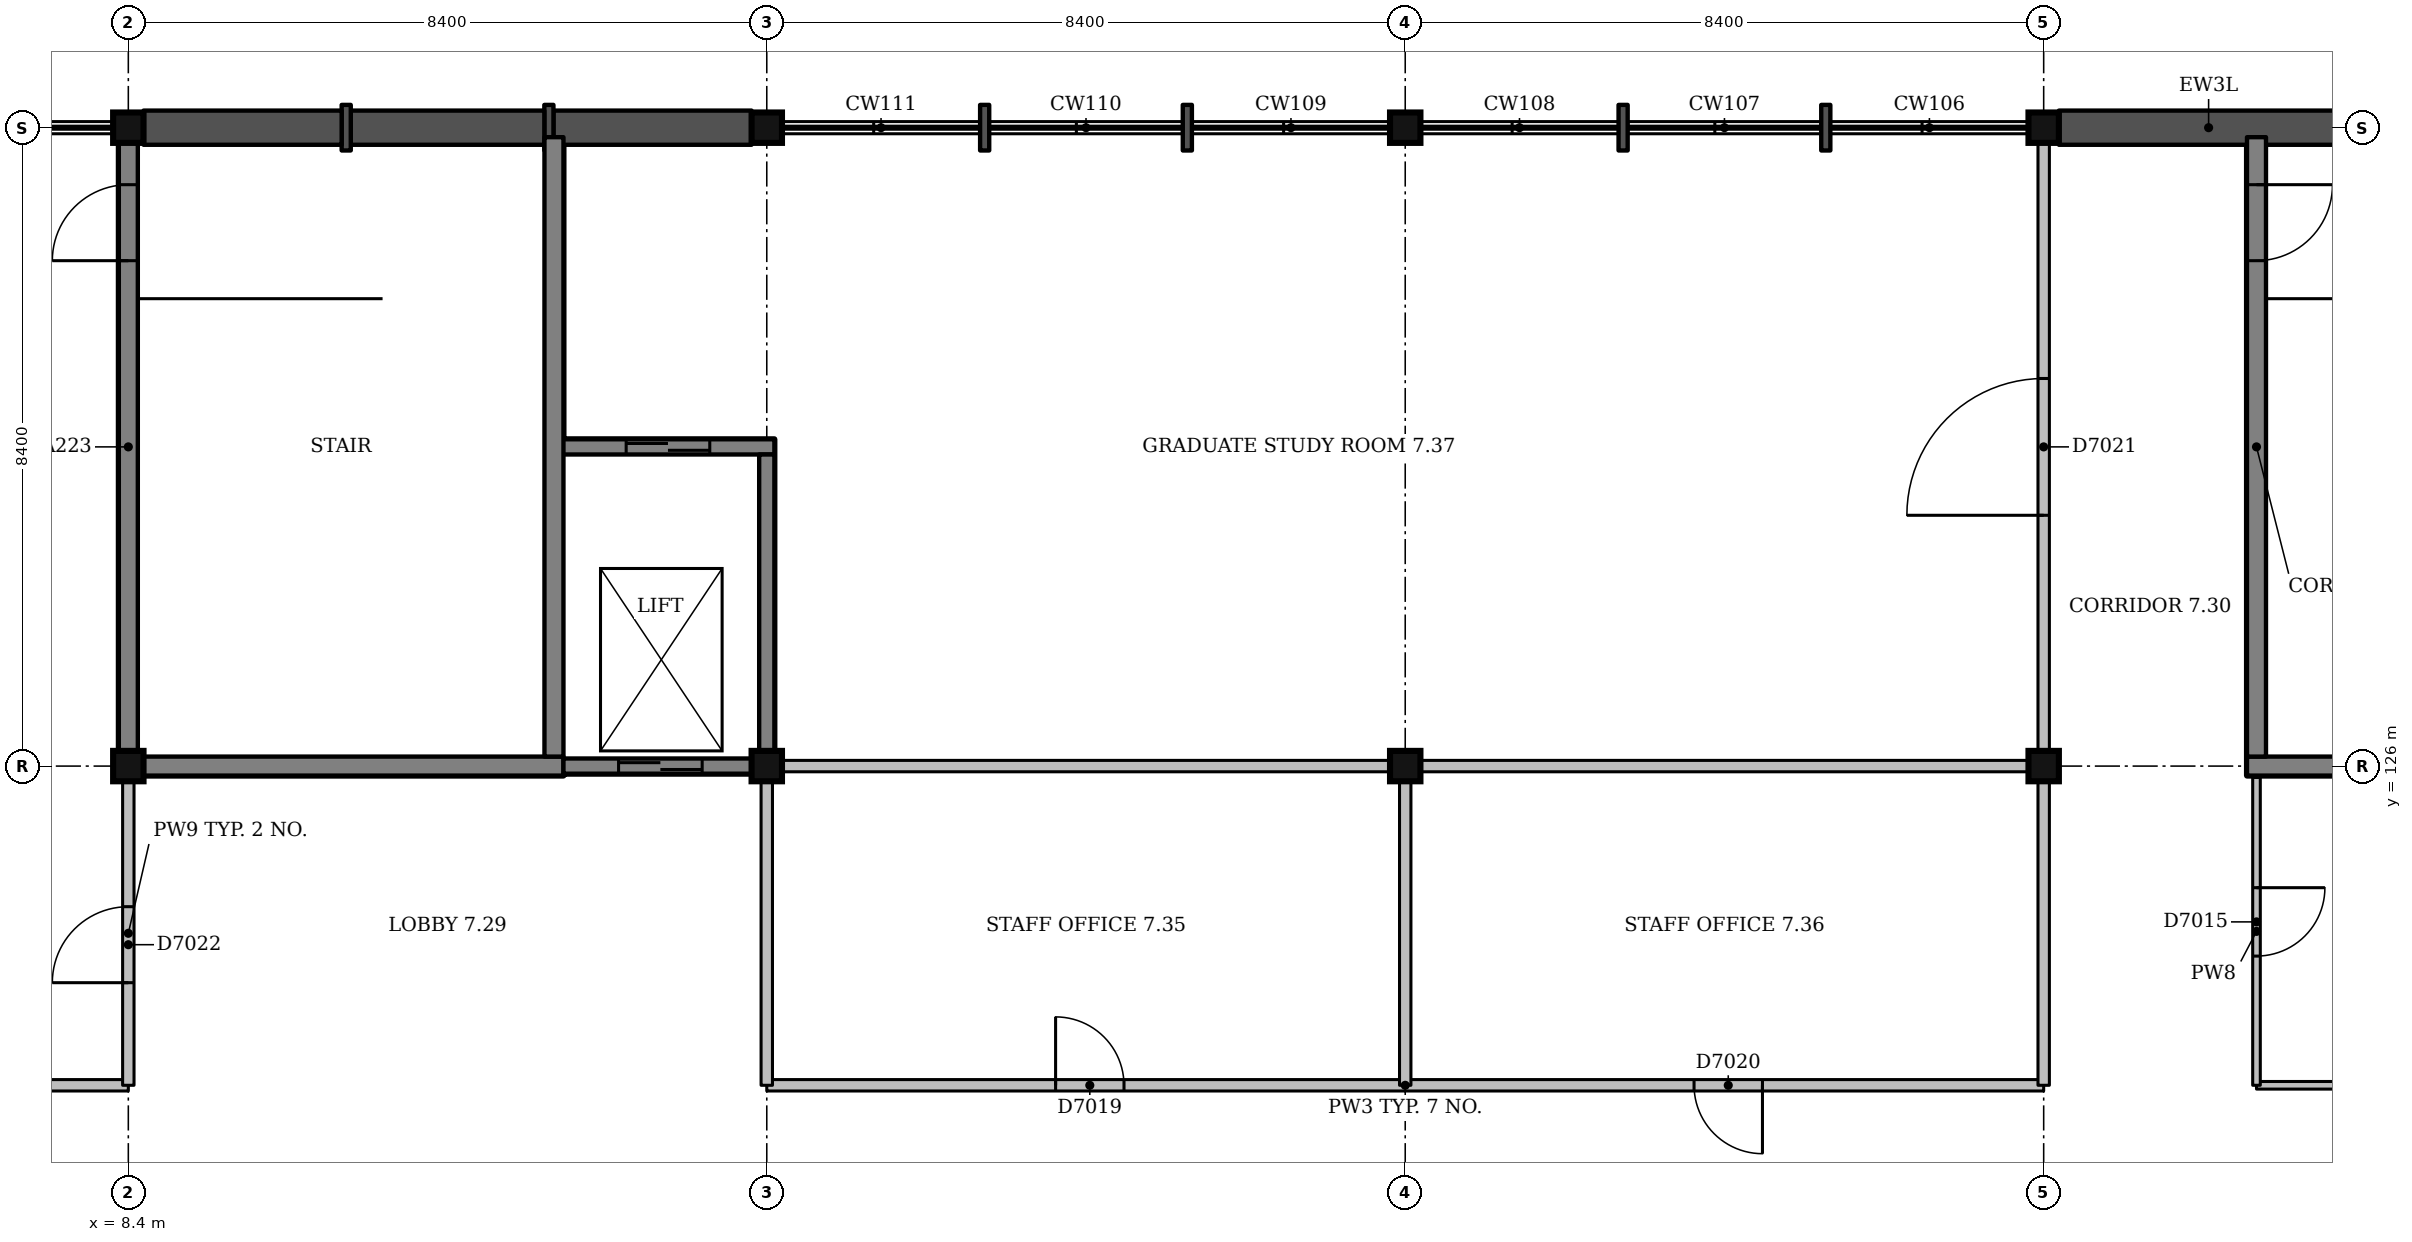
"""IFC4 building model, lengths in metres.
Left out: names, types, materials, properties, quantities, classifications, styles, units other than length and angle.
Written with IfcOpenShell. Run it as: python <this file> out.ifc"""

import sys

from ifc_helpers import new_model, si_unit, direction, frame, frame_2d, origin, origin_2d, place, context, subcontext, project, spatial, rectangle, extrude, element, fill, save


model = new_model("IFC4")
c1 = context("Model", 3, precision=1e-05, world=origin(), true_north=direction((0.0, 1.0)))
c2 = subcontext(c1, "Body", "Model", "MODEL_VIEW")
j1 = project(units=[si_unit("LENGTHUNIT", "METRE"), si_unit("PLANEANGLEUNIT", "RADIAN")], contexts=[c1])
p1 = place(None, origin())
s1 = spatial("IfcSite", under=j1, at=p1, CompositionType="ELEMENT")
p2 = place(p1, origin())
s2 = spatial("IfcBuilding", under=s1, at=p2, CompositionType="ELEMENT")
p3 = place(p2, frame((0.0, 0.0, 31.5)))
s3 = spatial("IfcBuildingStorey", under=s2, at=p3, CompositionType="ELEMENT", Elevation=31.5)
for number, where, z_axis, x_axis in (
    (1, (8.4, 126.0, 0.0), (0.0, 0.0, 1.0), (1.0, 0.0, 0.0)),
    (2, (8.4, 134.4, 0.0), (0.0, 0.0, 1.0), (1.0, 0.0, 0.0)),
    (3, (16.8, 126.0, 0.0), (0.0, 0.0, 1.0), (1.0, 0.0, 0.0)),
    (4, (16.8, 134.4, 0.0), (0.0, 0.0, 1.0), (1.0, 0.0, 0.0)),
    (5, (25.2, 126.0, 0.0), (0.0, 0.0, 1.0), (1.0, 0.0, 0.0)),
    (6, (25.2, 134.4, 0.0), (0.0, 0.0, 1.0), (1.0, 0.0, 0.0)),
    (7, (33.6, 126.0, 0.0), (0.0, 0.0, 1.0), (1.0, 0.0, 0.0)),
    (8, (33.6, 134.4, 0.0), (0.0, 0.0, 1.0), (1.0, 0.0, 0.0)),
):
    element("IfcColumn", number, at=place(p3, frame(where, z_axis=z_axis, x_axis=x_axis)), inside=s3, PredefinedType="COLUMN", context=c2, shape_type="SweptSolid", body=[
        extrude(rectangle(XDim=0.4, YDim=0.4, at=origin_2d()), origin(), (0.0, 0.0, 1.0), 4.5),
    ])
p4 = place(p3, frame((13.9, 130.2, 0.0), z_axis=(0.0, 0.0, 1.0), x_axis=(1.0, 0.0, 0.0)))
e9 = element("IfcWall", 9, at=p4, inside=s3, PredefinedType="SHEAR", context=c2, shape_type="SweptSolid", body=[
    extrude(rectangle(XDim=3.0, YDim=0.2, at=frame_2d((1.5, 0.0))), origin(), (0.0, 0.0, 1.0), 4.5),
])
p5 = place(p4, frame((1.05, 0.0, 0.0)))
e10 = element("IfcOpeningElement", 10, at=p5, cuts=e9, PredefinedType="OPENING", context=c2, shape_type="SweptSolid", body=[
    extrude(rectangle(XDim=1.1, YDim=2.1, at=frame_2d((0.55, 1.05))), frame((0.0, 0.11, 0.0), z_axis=(0.0, -1.0, 0.0), x_axis=(1.0, 0.0, 0.0)), (0.0, 0.0, 1.0), 0.22),
])
p6 = place(p3, frame((16.8, 126.2, 0.0), z_axis=(0.0, 0.0, 1.0), x_axis=(0.0, 1.0, 0.0)))
e11 = element("IfcWall", 11, at=p6, inside=s3, PredefinedType="SHEAR", context=c2, shape_type="SweptSolid", body=[
    extrude(rectangle(XDim=3.9, YDim=0.2, at=frame_2d((1.95, 0.0))), origin(), (0.0, 0.0, 1.0), 4.5),
])
p7 = place(p3, frame((36.275, 126.0, 0.0), z_axis=(0.0, 0.0, 1.0), x_axis=(1.0, 0.0, 0.0)))
e12 = element("IfcWall", 12, at=p7, inside=s3, PredefinedType="SHEAR", context=c2, shape_type="SweptSolid", body=[
    extrude(rectangle(XDim=5.525, YDim=0.25, at=frame_2d((2.763, 0.0))), origin(), (0.0, 0.0, 1.0), 4.2),
])
p8 = place(p3, frame((36.4, 126.125, 0.0), z_axis=(0.0, 0.0, 1.0), x_axis=(0.0, 1.0, 0.0)))
e13 = element("IfcWall", 13, at=p8, inside=s3, PredefinedType="SHEAR", context=c2, shape_type="SweptSolid", body=[
    extrude(rectangle(XDim=8.15, YDim=0.25, at=frame_2d((4.075, 0.0))), origin(), (0.0, 0.0, 1.0), 4.2),
])
p9 = place(p8, frame((6.525, 0.0, 0.0)))
e14 = element("IfcOpeningElement", 14, at=p9, cuts=e13, PredefinedType="OPENING", context=c2, shape_type="SweptSolid", body=[
    extrude(rectangle(XDim=1.0, YDim=2.1, at=frame_2d((0.5, 1.05))), frame((0.0, 0.135, 0.0), z_axis=(0.0, -1.0, 0.0), x_axis=(1.0, 0.0, 0.0)), (0.0, 0.0, 1.0), 0.27),
])
p10 = place(p3, frame((8.6, 126.0, 0.0), z_axis=(0.0, 0.0, 1.0), x_axis=(1.0, 0.0, 0.0)))
e15 = element("IfcWall", 15, at=p10, inside=s3, PredefinedType="SHEAR", context=c2, shape_type="SweptSolid", body=[
    extrude(rectangle(XDim=5.525, YDim=0.25, at=frame_2d((2.762, 0.0))), origin(), (0.0, 0.0, 1.0), 4.2),
])
p11 = place(p3, frame((8.4, 126.2, 0.0), z_axis=(0.0, 0.0, 1.0), x_axis=(0.0, 1.0, 0.0)))
e16 = element("IfcWall", 16, at=p11, inside=s3, PredefinedType="SHEAR", context=c2, shape_type="SweptSolid", body=[
    extrude(rectangle(XDim=8.0, YDim=0.25, at=frame_2d((4.0, 0.0))), origin(), (0.0, 0.0, 1.0), 4.2),
])
p12 = place(p11, frame((6.45, 0.0, 0.0)))
e17 = element("IfcOpeningElement", 17, at=p12, cuts=e16, PredefinedType="OPENING", context=c2, shape_type="SweptSolid", body=[
    extrude(rectangle(XDim=1.0, YDim=2.1, at=frame_2d((0.5, 1.05))), frame((0.0, 0.135, 0.0), z_axis=(0.0, -1.0, 0.0), x_axis=(1.0, 0.0, 0.0)), (0.0, 0.0, 1.0), 0.27),
])
p13 = place(p3, frame((14.0, 126.125, 0.0), z_axis=(0.0, 0.0, 1.0), x_axis=(0.0, 1.0, 0.0)))
e18 = element("IfcWall", 18, at=p13, inside=s3, PredefinedType="SHEAR", context=c2, shape_type="SweptSolid", body=[
    extrude(rectangle(XDim=8.15, YDim=0.25, at=frame_2d((4.075, 0.0))), origin(), (0.0, 0.0, 1.0), 4.2),
])
p14 = place(p3, frame((37.74, 134.4, 0.0), z_axis=(0.0, 0.0, 1.0), x_axis=(-1.0, 0.0, 0.0)))
e19 = element("IfcWall", 19, at=p14, inside=s3, PredefinedType="SOLIDWALL", context=c2, shape_type="SweptSolid", body=[
    extrude(rectangle(XDim=3.94, YDim=0.45, at=frame_2d((1.97, 0.0))), origin(), (0.0, 0.0, 1.0), 3.6),
])
p15 = place(p3, frame((30.793, 134.4, 0.0), z_axis=(0.0, 0.0, 1.0), x_axis=(-1.0, 0.0, 0.0)))
e20 = element("IfcWall", 20, at=p15, inside=s3, PredefinedType="SOLIDWALL", context=c2, shape_type="SweptSolid", body=[
    extrude(rectangle(XDim=0.12, YDim=0.6, at=frame_2d((0.06, 0.0))), origin(), (0.0, 0.0, 1.0), 3.6),
])
for number, where, z_axis, x_axis in (
    (21, (28.127, 134.4, 0.0), (0.0, 0.0, 1.0), (-1.0, 0.0, 0.0)),
    (22, (22.393, 134.4, 0.0), (0.0, 0.0, 1.0), (-1.0, 0.0, 0.0)),
    (23, (19.727, 134.4, 0.0), (0.0, 0.0, 1.0), (-1.0, 0.0, 0.0)),
):
    element("IfcWall", number, at=place(p3, frame(where, z_axis=z_axis, x_axis=x_axis)), inside=s3, PredefinedType="SOLIDWALL", context=c2, shape_type="SweptSolid", body=[
        extrude(rectangle(XDim=0.12, YDim=0.6, at=frame_2d((0.06, 0.0))), origin(), (0.0, 0.0, 1.0), 3.6),
    ])
p16 = place(p3, frame((16.6, 134.4, 0.0), z_axis=(0.0, 0.0, 1.0), x_axis=(-1.0, 0.0, 0.0)))
e24 = element("IfcWall", 24, at=p16, inside=s3, PredefinedType="SOLIDWALL", context=c2, shape_type="SweptSolid", body=[
    extrude(rectangle(XDim=2.607, YDim=0.45, at=frame_2d((1.303, 0.0))), origin(), (0.0, 0.0, 1.0), 3.6),
])
p17 = place(p3, frame((13.993, 134.4, 0.0), z_axis=(0.0, 0.0, 1.0), x_axis=(-1.0, 0.0, 0.0)))
e25 = element("IfcWall", 25, at=p17, inside=s3, PredefinedType="SOLIDWALL", context=c2, shape_type="SweptSolid", body=[
    extrude(rectangle(XDim=0.12, YDim=0.6, at=frame_2d((0.06, 0.0))), origin(), (0.0, 0.0, 1.0), 3.6),
])
p18 = place(p3, frame((13.873, 134.4, 0.0), z_axis=(0.0, 0.0, 1.0), x_axis=(-1.0, 0.0, 0.0)))
e26 = element("IfcWall", 26, at=p18, inside=s3, PredefinedType="SOLIDWALL", context=c2, shape_type="SweptSolid", body=[
    extrude(rectangle(XDim=2.547, YDim=0.45, at=frame_2d((1.273, 0.0))), origin(), (0.0, 0.0, 1.0), 3.6),
])
p19 = place(p3, frame((11.327, 134.4, 0.0), z_axis=(0.0, 0.0, 1.0), x_axis=(-1.0, 0.0, 0.0)))
e27 = element("IfcWall", 27, at=p19, inside=s3, PredefinedType="SOLIDWALL", context=c2, shape_type="SweptSolid", body=[
    extrude(rectangle(XDim=0.12, YDim=0.6, at=frame_2d((0.06, 0.0))), origin(), (0.0, 0.0, 1.0), 3.6),
])
p20 = place(p3, frame((11.207, 134.4, 0.0), z_axis=(0.0, 0.0, 1.0), x_axis=(-1.0, 0.0, 0.0)))
e28 = element("IfcWall", 28, at=p20, inside=s3, PredefinedType="SOLIDWALL", context=c2, shape_type="SweptSolid", body=[
    extrude(rectangle(XDim=2.607, YDim=0.45, at=frame_2d((1.303, 0.0))), origin(), (0.0, 0.0, 1.0), 3.6),
])
p21 = place(p3, frame((0.275, 121.8, 0.0), z_axis=(0.0, 0.0, 1.0), x_axis=(1.0, 0.0, 0.0)))
e29 = element("IfcWall", 29, at=p21, inside=s3, PredefinedType="PARTITIONING", context=c2, shape_type="SweptSolid", body=[
    extrude(rectangle(XDim=8.125, YDim=0.15, at=frame_2d((4.062, 0.0))), origin(), (0.0, 0.0, 1.0), 3.6),
])
p22 = place(p3, frame((16.8, 121.8, 0.0), z_axis=(0.0, 0.0, 1.0), x_axis=(1.0, 0.0, 0.0)))
e30 = element("IfcWall", 30, at=p22, inside=s3, PredefinedType="PARTITIONING", context=c2, shape_type="SweptSolid", body=[
    extrude(rectangle(XDim=16.8, YDim=0.15, at=frame_2d((8.4, 0.0))), origin(), (0.0, 0.0, 1.0), 3.6),
])
p23 = place(p22, frame((3.8, 0.0, 0.0)))
e31 = element("IfcOpeningElement", 31, at=p23, cuts=e30, PredefinedType="OPENING", context=c2, shape_type="SweptSolid", body=[
    extrude(rectangle(XDim=0.9, YDim=2.1, at=frame_2d((0.45, 1.05))), frame((0.0, 0.085, 0.0), z_axis=(0.0, -1.0, 0.0), x_axis=(1.0, 0.0, 0.0)), (0.0, 0.0, 1.0), 0.17),
])
p24 = place(p22, frame((12.2, 0.0, 0.0)))
e32 = element("IfcOpeningElement", 32, at=p24, cuts=e30, PredefinedType="OPENING", context=c2, shape_type="SweptSolid", body=[
    extrude(rectangle(XDim=0.9, YDim=2.1, at=frame_2d((0.45, 1.05))), frame((0.0, 0.085, 0.0), z_axis=(0.0, -1.0, 0.0), x_axis=(1.0, 0.0, 0.0)), (0.0, 0.0, 1.0), 0.17),
])
p25 = place(p3, frame((36.4, 121.8, 0.0), z_axis=(0.0, 0.0, 1.0), x_axis=(1.0, 0.0, 0.0)))
e33 = element("IfcWall", 33, at=p25, inside=s3, PredefinedType="PARTITIONING", context=c2, shape_type="SweptSolid", body=[
    extrude(rectangle(XDim=5.4, YDim=0.1, at=frame_2d((2.7, 0.0))), origin(), (0.0, 0.0, 1.0), 4.15),
])
for number, where, z_axis, x_axis in (
    (34, (17.0, 126.0, 0.0), (0.0, 0.0, 1.0), (1.0, 0.0, 0.0)),
    (35, (25.4, 126.0, 0.0), (0.0, 0.0, 1.0), (1.0, 0.0, 0.0)),
):
    element("IfcWall", number, at=place(p3, frame(where, z_axis=z_axis, x_axis=x_axis)), inside=s3, PredefinedType="PARTITIONING", context=c2, shape_type="SweptSolid", body=[
        extrude(rectangle(XDim=8.0, YDim=0.15, at=frame_2d((4.0, 0.0))), origin(), (0.0, 0.0, 1.0), 3.6),
    ])
p26 = place(p3, frame((8.4, 121.8, 0.0), z_axis=(0.0, 0.0, 1.0), x_axis=(0.0, 1.0, 0.0)))
e36 = element("IfcWall", 36, at=p26, inside=s3, PredefinedType="PARTITIONING", context=c2, shape_type="SweptSolid", body=[
    extrude(rectangle(XDim=4.0, YDim=0.15, at=frame_2d((2.0, 0.0))), origin(), (0.0, 0.0, 1.0), 3.6),
])
p27 = place(p26, frame((1.35, 0.0, 0.0)))
e37 = element("IfcOpeningElement", 37, at=p27, cuts=e36, PredefinedType="OPENING", context=c2, shape_type="SweptSolid", body=[
    extrude(rectangle(XDim=1.0, YDim=2.1, at=frame_2d((0.5, 1.05))), frame((0.0, 0.085, 0.0), z_axis=(0.0, -1.0, 0.0), x_axis=(1.0, 0.0, 0.0)), (0.0, 0.0, 1.0), 0.17),
])
for number, where, z_axis, x_axis in (
    (38, (16.8, 121.8, 0.0), (0.0, 0.0, 1.0), (0.0, 1.0, 0.0)),
    (39, (25.2, 121.8, 0.0), (0.0, 0.0, 1.0), (0.0, 1.0, 0.0)),
    (40, (33.6, 121.8, 0.0), (0.0, 0.0, 1.0), (0.0, 1.0, 0.0)),
):
    element("IfcWall", number, at=place(p3, frame(where, z_axis=z_axis, x_axis=x_axis)), inside=s3, PredefinedType="PARTITIONING", context=c2, shape_type="SweptSolid", body=[
        extrude(rectangle(XDim=4.0, YDim=0.15, at=frame_2d((2.0, 0.0))), origin(), (0.0, 0.0, 1.0), 3.6),
    ])
p28 = place(p3, frame((33.6, 126.2, 0.0), z_axis=(0.0, 0.0, 1.0), x_axis=(0.0, 1.0, 0.0)))
e41 = element("IfcWall", 41, at=p28, inside=s3, PredefinedType="PARTITIONING", context=c2, shape_type="SweptSolid", body=[
    extrude(rectangle(XDim=8.0, YDim=0.15, at=frame_2d((4.0, 0.0))), origin(), (0.0, 0.0, 1.0), 3.6),
])
p29 = place(p28, frame((3.1, 0.0, 0.0)))
e42 = element("IfcOpeningElement", 42, at=p29, cuts=e41, PredefinedType="OPENING", context=c2, shape_type="SweptSolid", body=[
    extrude(rectangle(XDim=1.8, YDim=2.1, at=frame_2d((0.9, 1.05))), frame((0.0, 0.085, 0.0), z_axis=(0.0, -1.0, 0.0), x_axis=(1.0, 0.0, 0.0)), (0.0, 0.0, 1.0), 0.17),
])
p30 = place(p3, frame((36.4, 121.8, 0.0), z_axis=(0.0, 0.0, 1.0), x_axis=(0.0, 1.0, 0.0)))
e43 = element("IfcWall", 43, at=p30, inside=s3, PredefinedType="PARTITIONING", context=c2, shape_type="SweptSolid", body=[
    extrude(rectangle(XDim=4.05, YDim=0.1, at=frame_2d((2.025, 0.0))), origin(), (0.0, 0.0, 1.0), 3.6),
])
p31 = place(p30, frame((1.7, 0.0, 0.0)))
e44 = element("IfcOpeningElement", 44, at=p31, cuts=e43, PredefinedType="OPENING", context=c2, shape_type="SweptSolid", body=[
    extrude(rectangle(XDim=0.9, YDim=2.1, at=frame_2d((0.45, 1.05))), frame((0.0, 0.06, 0.0), z_axis=(0.0, -1.0, 0.0), x_axis=(1.0, 0.0, 0.0)), (0.0, 0.0, 1.0), 0.12),
])
p32 = place(p3, frame((14.125, 126.0, 0.0), z_axis=(0.0, 0.0, 1.0), x_axis=(1.0, 0.0, 0.0)))
e45 = element("IfcWall", 45, at=p32, inside=s3, PredefinedType="SHEAR", context=c2, shape_type="SweptSolid", body=[
    extrude(rectangle(XDim=2.475, YDim=0.2, at=frame_2d((1.238, 0.0))), origin(), (0.0, 0.0, 1.0), 4.5),
])
p33 = place(p32, frame((0.725, 0.0, 0.0)))
e46 = element("IfcOpeningElement", 46, at=p33, cuts=e45, PredefinedType="OPENING", context=c2, shape_type="SweptSolid", body=[
    extrude(rectangle(XDim=1.1, YDim=2.1, at=frame_2d((0.55, 1.05))), frame((0.0, 0.11, 0.0), z_axis=(0.0, -1.0, 0.0), x_axis=(1.0, 0.0, 0.0)), (0.0, 0.0, 1.0), 0.22),
])
p34 = place(p3, frame((0.0, 0.0, 4.2)))
p35 = place(p34, frame((21.0, 121.8, 0.0)))
p36 = place(p35, frame((0.0, 0.0, 0.25)))
e47 = element("IfcWindow", 47, at=p36, inside=s3, PartitioningType="SINGLE_PANEL", PredefinedType="SKYLIGHT", context=c2, shape_type="SweptSolid", body=[
    extrude(rectangle(XDim=0.9, YDim=1.2, at=origin_2d()), origin(), (0.0, 0.0, 1.0), 0.05),
])
p37 = place(p31, origin())
e48 = element("IfcDoor", 48, at=p37, inside=s3, OperationType="SINGLE_SWING_RIGHT", PredefinedType="DOOR", context=c2, shape_type="SweptSolid", body=[
    extrude(rectangle(XDim=0.9, YDim=2.1, at=frame_2d((0.45, 1.05))), frame((0.0, 0.025, 0.0), z_axis=(0.0, -1.0, 0.0), x_axis=(1.0, 0.0, 0.0)), (0.0, 0.0, 1.0), 0.05),
])
fill(e44, e48)
p38 = place(p23, origin())
e49 = element("IfcDoor", 49, at=p38, inside=s3, OperationType="SINGLE_SWING_LEFT", PredefinedType="DOOR", context=c2, shape_type="SweptSolid", body=[
    extrude(rectangle(XDim=0.9, YDim=2.1, at=frame_2d((0.45, 1.05))), frame((0.0, 0.025, 0.0), z_axis=(0.0, -1.0, 0.0), x_axis=(1.0, 0.0, 0.0)), (0.0, 0.0, 1.0), 0.05),
])
fill(e31, e49)
p39 = place(p24, origin())
e50 = element("IfcDoor", 50, at=p39, inside=s3, OperationType="SINGLE_SWING_RIGHT", PredefinedType="DOOR", context=c2, shape_type="SweptSolid", body=[
    extrude(rectangle(XDim=0.9, YDim=2.1, at=frame_2d((0.45, 1.05))), frame((0.0, 0.025, 0.0), z_axis=(0.0, -1.0, 0.0), x_axis=(1.0, 0.0, 0.0)), (0.0, 0.0, 1.0), 0.05),
])
fill(e32, e50)
p40 = place(p29, origin())
e51 = element("IfcDoor", 51, at=p40, inside=s3, OperationType="DOUBLE_DOOR_SINGLE_SWING", PredefinedType="DOOR", context=c2, shape_type="SweptSolid", body=[
    extrude(rectangle(XDim=1.8, YDim=2.1, at=frame_2d((0.9, 1.05))), frame((0.0, 0.025, 0.0), z_axis=(0.0, -1.0, 0.0), x_axis=(1.0, 0.0, 0.0)), (0.0, 0.0, 1.0), 0.05),
])
fill(e42, e51)
p41 = place(p27, origin())
e52 = element("IfcDoor", 52, at=p41, inside=s3, OperationType="SINGLE_SWING_LEFT", PredefinedType="DOOR", context=c2, shape_type="SweptSolid", body=[
    extrude(rectangle(XDim=1.0, YDim=2.1, at=frame_2d((0.5, 1.05))), frame((0.0, 0.025, 0.0), z_axis=(0.0, -1.0, 0.0), x_axis=(1.0, 0.0, 0.0)), (0.0, 0.0, 1.0), 0.05),
])
fill(e37, e52)
p42 = place(p9, origin())
e53 = element("IfcDoor", 53, at=p42, inside=s3, OperationType="SINGLE_SWING_RIGHT", PredefinedType="DOOR", context=c2, shape_type="SweptSolid", body=[
    extrude(rectangle(XDim=1.0, YDim=2.1, at=frame_2d((0.5, 1.05))), frame((0.0, 0.025, 0.0), z_axis=(0.0, -1.0, 0.0), x_axis=(1.0, 0.0, 0.0)), (0.0, 0.0, 1.0), 0.05),
])
fill(e14, e53)
p43 = place(p12, origin())
e54 = element("IfcDoor", 54, at=p43, inside=s3, OperationType="SINGLE_SWING_LEFT", PredefinedType="DOOR", context=c2, shape_type="SweptSolid", body=[
    extrude(rectangle(XDim=1.0, YDim=2.1, at=frame_2d((0.5, 1.05))), frame((0.0, 0.025, 0.0), z_axis=(0.0, -1.0, 0.0), x_axis=(1.0, 0.0, 0.0)), (0.0, 0.0, 1.0), 0.05),
])
fill(e17, e54)
p44 = place(p33, origin())
e55 = element("IfcDoor", 55, at=p44, inside=s3, OperationType="SLIDING_TO_RIGHT", PredefinedType="DOOR", context=c2, shape_type="SweptSolid", body=[
    extrude(rectangle(XDim=1.1, YDim=2.1, at=frame_2d((0.55, 1.05))), frame((0.0, 0.025, 0.0), z_axis=(0.0, -1.0, 0.0), x_axis=(1.0, 0.0, 0.0)), (0.0, 0.0, 1.0), 0.05),
])
fill(e46, e55)
p45 = place(p5, origin())
e56 = element("IfcDoor", 56, at=p45, inside=s3, OperationType="SLIDING_TO_LEFT", PredefinedType="DOOR", context=c2, shape_type="SweptSolid", body=[
    extrude(rectangle(XDim=1.1, YDim=2.1, at=frame_2d((0.55, 1.05))), frame((0.0, 0.025, 0.0), z_axis=(0.0, -1.0, 0.0), x_axis=(1.0, 0.0, 0.0)), (0.0, 0.0, 1.0), 0.05),
])
fill(e10, e56)
p46 = place(p2, frame((0.0, 0.0, 36.0)))
p47 = place(p46, frame((0.0, 0.0, 1.3)))
p48 = place(p47, frame((15.4, 128.1, 0.0)))
p49 = place(p48, frame((0.0, 0.0, 0.15)))
e57 = element("IfcWindow", 57, at=p49, inside=s3, PartitioningType="SINGLE_PANEL", PredefinedType="SKYLIGHT", context=c2, shape_type="SweptSolid", body=[
    extrude(rectangle(XDim=0.9, YDim=1.2, at=origin_2d()), origin(), (0.0, 0.0, 1.0), 0.05),
])
save(model, sys.argv[1])
